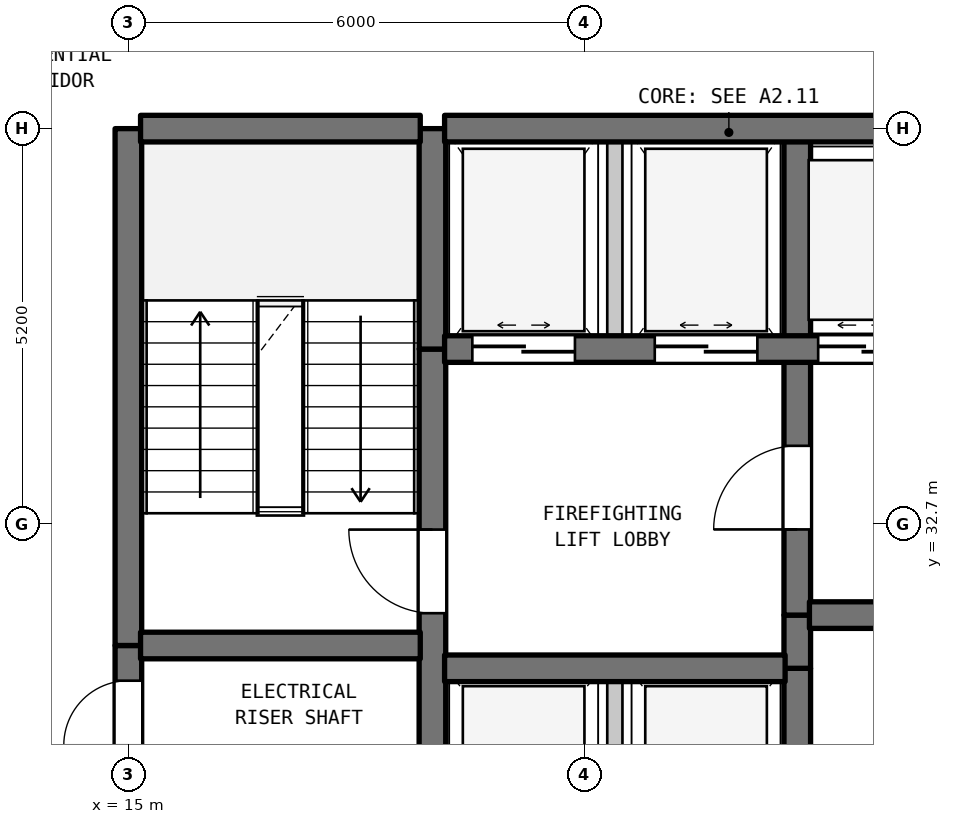
"""IFC4 building model, lengths in metres.
Left out: names, types, materials, properties, quantities, classifications, styles, units other than length and angle.
Written with IfcOpenShell. Run it as: python <this file> out.ifc"""

import sys

from ifc_helpers import new_model, si_unit, direction, frame, frame_2d, origin, place, context, subcontext, project, spatial, rectangle, extrude, element, fill, save


model = new_model("IFC4")
c1 = context("Model", 3, precision=1e-05, world=origin(), true_north=direction((0.0, 1.0)))
c2 = subcontext(c1, "Body", "Model", "MODEL_VIEW")
j1 = project(units=[si_unit("LENGTHUNIT", "METRE"), si_unit("PLANEANGLEUNIT", "RADIAN")], contexts=[c1])
p1 = place(None, origin())
s1 = spatial("IfcSite", under=j1, at=p1, CompositionType="ELEMENT")
p2 = place(p1, origin())
s2 = spatial("IfcBuilding", under=s1, at=p2, CompositionType="ELEMENT")
p3 = place(p2, frame((0.0, 0.0, 102.0)))
s3 = spatial("IfcBuildingStorey", under=s2, at=p3, CompositionType="ELEMENT", Elevation=102.0)
p4 = place(p3, frame((15.0, 29.5, 0.0), z_axis=(0.0, 0.0, 1.0), x_axis=(0.0, 1.0, 0.0)))
e1 = element("IfcWall", 1, at=p4, inside=s3, PredefinedType="SHEAR", context=c2, shape_type="SweptSolid", body=[
    extrude(rectangle(XDim=1.6, YDim=0.35, at=frame_2d((0.8, 0.0))), origin(), (0.0, 0.0, 1.0), 3.385),
])
p5 = place(p4, frame((0.287, 0.0, 0.0)))
e2 = element("IfcOpeningElement", 2, at=p5, cuts=e1, PredefinedType="OPENING", context=c2, shape_type="SweptSolid", body=[
    extrude(rectangle(XDim=0.85, YDim=2.1, at=frame_2d((0.425, 1.05))), frame((0.0, 0.185, 0.0), z_axis=(0.0, -1.0, 0.0), x_axis=(1.0, 0.0, 0.0)), (0.0, 0.0, 1.0), 0.37),
])
p6 = place(p3, frame((15.0, 31.1, 0.0), z_axis=(0.0, 0.0, 1.0), x_axis=(0.0, 1.0, 0.0)))
e3 = element("IfcWall", 3, at=p6, inside=s3, PredefinedType="SHEAR", context=c2, shape_type="SweptSolid", body=[
    extrude(rectangle(XDim=6.8, YDim=0.35, at=frame_2d((3.4, 0.0))), origin(), (0.0, 0.0, 1.0), 3.385),
])
p7 = place(p3, frame((19.0, 29.5, 0.0), z_axis=(0.0, 0.0, 1.0), x_axis=(0.0, 1.0, 0.0)))
e4 = element("IfcWall", 4, at=p7, inside=s3, PredefinedType="SHEAR", context=c2, shape_type="SweptSolid", body=[
    extrude(rectangle(XDim=5.5, YDim=0.35, at=frame_2d((2.75, 0.0))), origin(), (0.0, 0.0, 1.0), 3.385),
])
p8 = place(p7, frame((2.025, 0.0, 0.0)))
e5 = element("IfcOpeningElement", 5, at=p8, cuts=e4, PredefinedType="OPENING", context=c2, shape_type="SweptSolid", body=[
    extrude(rectangle(XDim=1.1, YDim=2.15, at=frame_2d((0.55, 1.075))), frame((0.0, 0.185, 0.0), z_axis=(0.0, -1.0, 0.0), x_axis=(1.0, 0.0, 0.0)), (0.0, 0.0, 1.0), 0.37),
])
p9 = place(p3, frame((19.0, 35.0, 0.0), z_axis=(0.0, 0.0, 1.0), x_axis=(0.0, 1.0, 0.0)))
e6 = element("IfcWall", 6, at=p9, inside=s3, PredefinedType="SHEAR", context=c2, shape_type="SweptSolid", body=[
    extrude(rectangle(XDim=2.9, YDim=0.35, at=frame_2d((1.45, 0.0))), origin(), (0.0, 0.0, 1.0), 3.385),
])
p10 = place(p3, frame((21.4, 28.2, 0.0), z_axis=(0.0, 0.0, 1.0), x_axis=(0.0, 1.0, 0.0)))
e7 = element("IfcWall", 7, at=p10, inside=s3, PredefinedType="STANDARD", context=c2, shape_type="SweptSolid", body=[
    extrude(rectangle(XDim=2.6, YDim=0.2, at=frame_2d((1.3, 0.0))), origin(), (0.0, 0.0, 1.0), 3.385),
])
p11 = place(p3, frame((21.4, 35.0, 0.0), z_axis=(0.0, 0.0, 1.0), x_axis=(0.0, 1.0, 0.0)))
e8 = element("IfcWall", 8, at=p11, inside=s3, PredefinedType="STANDARD", context=c2, shape_type="SweptSolid", body=[
    extrude(rectangle(XDim=2.9, YDim=0.2, at=frame_2d((1.45, 0.0))), origin(), (0.0, 0.0, 1.0), 3.385),
])
p12 = place(p3, frame((23.8, 29.5, 0.0), z_axis=(0.0, 0.0, 1.0), x_axis=(0.0, 1.0, 0.0)))
e9 = element("IfcWall", 9, at=p12, inside=s3, PredefinedType="SHEAR", context=c2, shape_type="SweptSolid", body=[
    extrude(rectangle(XDim=1.3, YDim=0.35, at=frame_2d((0.65, 0.0))), origin(), (0.0, 0.0, 1.0), 3.385),
])
p13 = place(p3, frame((23.8, 30.8, 0.0), z_axis=(0.0, 0.0, 1.0), x_axis=(0.0, 1.0, 0.0)))
e10 = element("IfcWall", 10, at=p13, inside=s3, PredefinedType="SHEAR", context=c2, shape_type="SweptSolid", body=[
    extrude(rectangle(XDim=0.7, YDim=0.35, at=frame_2d((0.35, 0.0))), origin(), (0.0, 0.0, 1.0), 3.385),
])
p14 = place(p3, frame((23.8, 31.5, 0.0), z_axis=(0.0, 0.0, 1.0), x_axis=(0.0, 1.0, 0.0)))
e11 = element("IfcWall", 11, at=p14, inside=s3, PredefinedType="SHEAR", context=c2, shape_type="SweptSolid", body=[
    extrude(rectangle(XDim=3.5, YDim=0.35, at=frame_2d((1.75, 0.0))), origin(), (0.0, 0.0, 1.0), 3.385),
])
p15 = place(p14, frame((1.127, 0.0, 0.0)))
e12 = element("IfcOpeningElement", 12, at=p15, cuts=e11, PredefinedType="OPENING", context=c2, shape_type="SweptSolid", body=[
    extrude(rectangle(XDim=1.1, YDim=2.15, at=frame_2d((0.55, 1.075))), frame((0.0, 0.185, 0.0), z_axis=(0.0, -1.0, 0.0), x_axis=(1.0, 0.0, 0.0)), (0.0, 0.0, 1.0), 0.37),
])
p16 = place(p3, frame((23.8, 35.0, 0.0), z_axis=(0.0, 0.0, 1.0), x_axis=(0.0, 1.0, 0.0)))
e13 = element("IfcWall", 13, at=p16, inside=s3, PredefinedType="SHEAR", context=c2, shape_type="SweptSolid", body=[
    extrude(rectangle(XDim=2.9, YDim=0.35, at=frame_2d((1.45, 0.0))), origin(), (0.0, 0.0, 1.0), 3.385),
])
p17 = place(p3, frame((19.16, 30.8, 0.0), z_axis=(0.0, 0.0, 1.0), x_axis=(1.0, 0.0, 0.0)))
e14 = element("IfcWall", 14, at=p17, inside=s3, PredefinedType="SHEAR", context=c2, shape_type="SweptSolid", body=[
    extrude(rectangle(XDim=4.48, YDim=0.35, at=frame_2d((2.24, 0.0))), origin(), (0.0, 0.0, 1.0), 3.385),
])
p18 = place(p3, frame((15.16, 31.1, 0.0), z_axis=(0.0, 0.0, 1.0), x_axis=(1.0, 0.0, 0.0)))
e15 = element("IfcWall", 15, at=p18, inside=s3, PredefinedType="SHEAR", context=c2, shape_type="SweptSolid", body=[
    extrude(rectangle(XDim=3.68, YDim=0.35, at=frame_2d((1.84, 0.0))), origin(), (0.0, 0.0, 1.0), 3.385),
])
p19 = place(p3, frame((23.96, 31.5, 0.0), z_axis=(0.0, 0.0, 1.0), x_axis=(1.0, 0.0, 0.0)))
e16 = element("IfcWall", 16, at=p19, inside=s3, PredefinedType="SHEAR", context=c2, shape_type="SweptSolid", body=[
    extrude(rectangle(XDim=3.18, YDim=0.35, at=frame_2d((1.59, 0.0))), origin(), (0.0, 0.0, 1.0), 3.385),
])
p20 = place(p19, frame((1.094, 0.0, 0.0)))
e17 = element("IfcOpeningElement", 17, at=p20, cuts=e16, PredefinedType="OPENING", context=c2, shape_type="SweptSolid", body=[
    extrude(rectangle(XDim=0.85, YDim=2.1, at=frame_2d((0.425, 1.05))), frame((0.0, 0.185, 0.0), z_axis=(0.0, -1.0, 0.0), x_axis=(1.0, 0.0, 0.0)), (0.0, 0.0, 1.0), 0.37),
])
p21 = place(p3, frame((19.16, 35.0, 0.0), z_axis=(0.0, 0.0, 1.0), x_axis=(1.0, 0.0, 0.0)))
e18 = element("IfcWall", 18, at=p21, inside=s3, PredefinedType="SHEAR", context=c2, shape_type="SweptSolid", body=[
    extrude(rectangle(XDim=11.48, YDim=0.35, at=frame_2d((5.74, 0.0))), origin(), (0.0, 0.0, 1.0), 3.385),
])
p22 = place(p21, frame((0.365, 0.0, 0.0)))
e19 = element("IfcOpeningElement", 19, at=p22, cuts=e18, PredefinedType="OPENING", context=c2, shape_type="SweptSolid", body=[
    extrude(rectangle(XDim=1.35, YDim=2.2, at=frame_2d((0.675, 1.1))), frame((0.0, 0.185, 0.0), z_axis=(0.0, -1.0, 0.0), x_axis=(1.0, 0.0, 0.0)), (0.0, 0.0, 1.0), 0.37),
])
p23 = place(p21, frame((2.765, 0.0, 0.0)))
e20 = element("IfcOpeningElement", 20, at=p23, cuts=e18, PredefinedType="OPENING", context=c2, shape_type="SweptSolid", body=[
    extrude(rectangle(XDim=1.35, YDim=2.2, at=frame_2d((0.675, 1.1))), frame((0.0, 0.185, 0.0), z_axis=(0.0, -1.0, 0.0), x_axis=(1.0, 0.0, 0.0)), (0.0, 0.0, 1.0), 0.37),
])
p24 = place(p21, frame((4.915, 0.0, 0.0)))
e21 = element("IfcOpeningElement", 21, at=p24, cuts=e18, PredefinedType="OPENING", context=c2, shape_type="SweptSolid", body=[
    extrude(rectangle(XDim=1.2, YDim=2.2, at=frame_2d((0.6, 1.1))), frame((0.0, 0.185, 0.0), z_axis=(0.0, -1.0, 0.0), x_axis=(1.0, 0.0, 0.0)), (0.0, 0.0, 1.0), 0.37),
])
p25 = place(p21, frame((6.665, 0.0, 0.0)))
e22 = element("IfcOpeningElement", 22, at=p25, cuts=e18, PredefinedType="OPENING", context=c2, shape_type="SweptSolid", body=[
    extrude(rectangle(XDim=1.2, YDim=2.2, at=frame_2d((0.6, 1.1))), frame((0.0, 0.185, 0.0), z_axis=(0.0, -1.0, 0.0), x_axis=(1.0, 0.0, 0.0)), (0.0, 0.0, 1.0), 0.37),
])
p26 = place(p21, frame((8.415, 0.0, 0.0)))
e23 = element("IfcOpeningElement", 23, at=p26, cuts=e18, PredefinedType="OPENING", context=c2, shape_type="SweptSolid", body=[
    extrude(rectangle(XDim=1.2, YDim=2.2, at=frame_2d((0.6, 1.1))), frame((0.0, 0.185, 0.0), z_axis=(0.0, -1.0, 0.0), x_axis=(1.0, 0.0, 0.0)), (0.0, 0.0, 1.0), 0.37),
])
p27 = place(p21, frame((10.16, 0.0, 0.0)))
e24 = element("IfcOpeningElement", 24, at=p27, cuts=e18, PredefinedType="OPENING", context=c2, shape_type="SweptSolid", body=[
    extrude(rectangle(XDim=1.2, YDim=2.2, at=frame_2d((0.6, 1.1))), frame((0.0, 0.185, 0.0), z_axis=(0.0, -1.0, 0.0), x_axis=(1.0, 0.0, 0.0)), (0.0, 0.0, 1.0), 0.37),
])
p28 = place(p3, frame((15.16, 37.9, 0.0), z_axis=(0.0, 0.0, 1.0), x_axis=(1.0, 0.0, 0.0)))
e25 = element("IfcWall", 25, at=p28, inside=s3, PredefinedType="SHEAR", context=c2, shape_type="SweptSolid", body=[
    extrude(rectangle(XDim=3.68, YDim=0.35, at=frame_2d((1.84, 0.0))), origin(), (0.0, 0.0, 1.0), 3.385),
])
p29 = place(p3, frame((19.16, 37.9, 0.0), z_axis=(0.0, 0.0, 1.0), x_axis=(1.0, 0.0, 0.0)))
e26 = element("IfcWall", 26, at=p29, inside=s3, PredefinedType="SHEAR", context=c2, shape_type="SweptSolid", body=[
    extrude(rectangle(XDim=11.48, YDim=0.35, at=frame_2d((5.74, 0.0))), origin(), (0.0, 0.0, 1.0), 3.385),
])
p30 = place(p5, origin())
e27 = element("IfcDoor", 27, at=p30, inside=s3, OperationType="SINGLE_SWING_LEFT", PredefinedType="DOOR", context=c2, shape_type="SweptSolid", body=[
    extrude(rectangle(XDim=0.85, YDim=2.1, at=frame_2d((0.425, 1.05))), frame((0.0, 0.025, 0.0), z_axis=(0.0, -1.0, 0.0), x_axis=(1.0, 0.0, 0.0)), (0.0, 0.0, 1.0), 0.05),
])
fill(e2, e27)
p31 = place(p8, origin())
e28 = element("IfcDoor", 28, at=p31, inside=s3, OperationType="SINGLE_SWING_RIGHT", PredefinedType="DOOR", context=c2, shape_type="SweptSolid", body=[
    extrude(rectangle(XDim=1.1, YDim=2.15, at=frame_2d((0.55, 1.075))), frame((0.0, 0.025, 0.0), z_axis=(0.0, -1.0, 0.0), x_axis=(1.0, 0.0, 0.0)), (0.0, 0.0, 1.0), 0.05),
])
fill(e5, e28)
p32 = place(p15, origin())
e29 = element("IfcDoor", 29, at=p32, inside=s3, OperationType="SINGLE_SWING_LEFT", PredefinedType="DOOR", context=c2, shape_type="SweptSolid", body=[
    extrude(rectangle(XDim=1.1, YDim=2.15, at=frame_2d((0.55, 1.075))), frame((0.0, 0.025, 0.0), z_axis=(0.0, -1.0, 0.0), x_axis=(1.0, 0.0, 0.0)), (0.0, 0.0, 1.0), 0.05),
])
fill(e12, e29)
p33 = place(p22, origin())
e30 = element("IfcDoor", 30, at=p33, inside=s3, OperationType="DOUBLE_DOOR_SLIDING", PredefinedType="DOOR", context=c2, shape_type="SweptSolid", body=[
    extrude(rectangle(XDim=1.35, YDim=2.2, at=frame_2d((0.675, 1.1))), frame((0.0, 0.025, 0.0), z_axis=(0.0, -1.0, 0.0), x_axis=(1.0, 0.0, 0.0)), (0.0, 0.0, 1.0), 0.05),
])
fill(e19, e30)
p34 = place(p23, origin())
e31 = element("IfcDoor", 31, at=p34, inside=s3, OperationType="DOUBLE_DOOR_SLIDING", PredefinedType="DOOR", context=c2, shape_type="SweptSolid", body=[
    extrude(rectangle(XDim=1.35, YDim=2.2, at=frame_2d((0.675, 1.1))), frame((0.0, 0.025, 0.0), z_axis=(0.0, -1.0, 0.0), x_axis=(1.0, 0.0, 0.0)), (0.0, 0.0, 1.0), 0.05),
])
fill(e20, e31)
p35 = place(p24, origin())
e32 = element("IfcDoor", 32, at=p35, inside=s3, OperationType="DOUBLE_DOOR_SLIDING", PredefinedType="DOOR", context=c2, shape_type="SweptSolid", body=[
    extrude(rectangle(XDim=1.2, YDim=2.2, at=frame_2d((0.6, 1.1))), frame((0.0, 0.025, 0.0), z_axis=(0.0, -1.0, 0.0), x_axis=(1.0, 0.0, 0.0)), (0.0, 0.0, 1.0), 0.05),
])
fill(e21, e32)
save(model, sys.argv[1])
